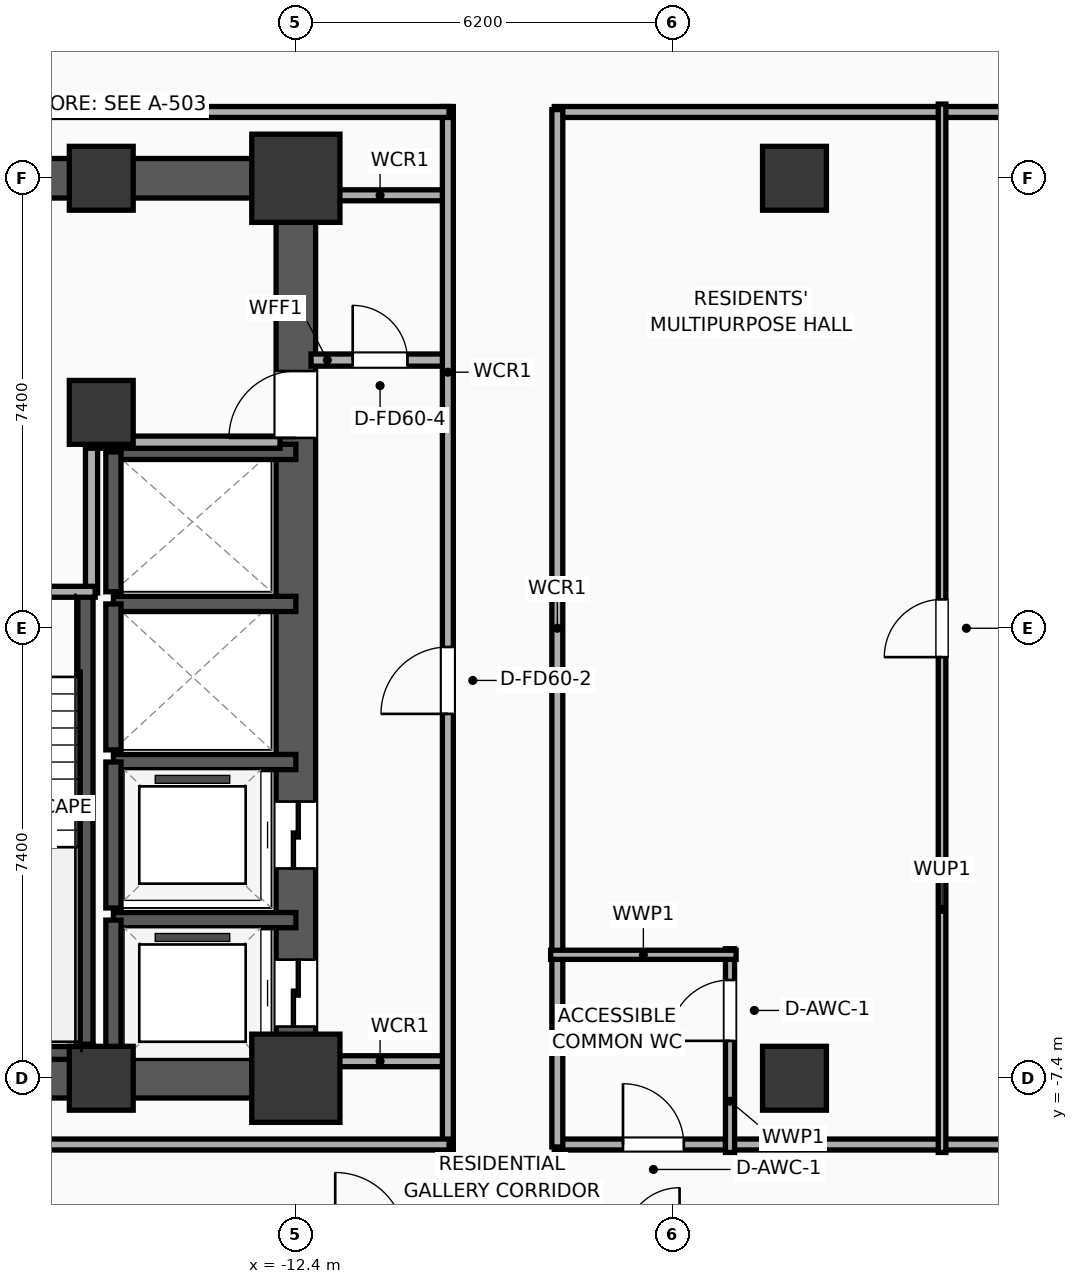
"""IFC4 building model, lengths in metres.
Left out: names, types, materials, properties, quantities, classifications, styles, units other than length and angle.
Written with IfcOpenShell. Run it as: python <this file> out.ifc"""

import sys

from ifc_helpers import new_model, si_unit, direction, frame, frame_2d, origin, origin_2d, place, context, subcontext, project, spatial, rectangle, extrude, element, fill, save


model = new_model("IFC4")
c1 = context("Model", 3, precision=1e-05, world=origin(), true_north=direction((0.0, 1.0)))
c2 = subcontext(c1, "Body", "Model", "MODEL_VIEW")
j1 = project(units=[si_unit("LENGTHUNIT", "METRE"), si_unit("PLANEANGLEUNIT", "RADIAN")], contexts=[c1])
p1 = place(None, origin())
s1 = spatial("IfcSite", under=j1, at=p1, CompositionType="ELEMENT")
p2 = place(p1, origin())
s2 = spatial("IfcBuilding", under=s1, at=p2, CompositionType="ELEMENT")
p3 = place(p2, frame((0.0, 0.0, 68.9)))
s3 = spatial("IfcBuildingStorey", under=s2, at=p3, CompositionType="ELEMENT", Elevation=68.9)
for number, where, z_axis, x_axis in (
    (1, (-15.6, -7.4, 0.0), (0.0, 0.0, 1.0), (1.0, 0.0, 0.0)),
    (2, (-15.6, 7.4, 0.0), (0.0, 0.0, 1.0), (1.0, 0.0, 0.0)),
):
    element("IfcColumn", number, at=place(p3, frame(where, z_axis=z_axis, x_axis=x_axis)), inside=s3, PredefinedType="COLUMN", context=c2, shape_type="SweptSolid", body=[
        extrude(rectangle(XDim=1.05, YDim=1.05, at=origin_2d()), origin(), (0.0, 0.0, 1.0), 3.9),
    ])
p4 = place(p3, frame((-12.4, -7.4, 0.0), z_axis=(0.0, 0.0, 1.0), x_axis=(1.0, 0.0, 0.0)))
e3 = element("IfcColumn", 3, at=p4, inside=s3, PredefinedType="COLUMN", context=c2, shape_type="SweptSolid", body=[
    extrude(rectangle(XDim=1.45, YDim=1.45, at=origin_2d()), origin(), (0.0, 0.0, 1.0), 3.9),
])
p5 = place(p3, frame((-15.6, 3.55, 0.0), z_axis=(0.0, 0.0, 1.0), x_axis=(1.0, 0.0, 0.0)))
e4 = element("IfcColumn", 4, at=p5, inside=s3, PredefinedType="COLUMN", context=c2, shape_type="SweptSolid", body=[
    extrude(rectangle(XDim=1.05, YDim=1.05, at=origin_2d()), origin(), (0.0, 0.0, 1.0), 3.9),
])
p6 = place(p3, frame((-12.4, 7.4, 0.0), z_axis=(0.0, 0.0, 1.0), x_axis=(1.0, 0.0, 0.0)))
e5 = element("IfcColumn", 5, at=p6, inside=s3, PredefinedType="COLUMN", context=c2, shape_type="SweptSolid", body=[
    extrude(rectangle(XDim=1.45, YDim=1.45, at=origin_2d()), origin(), (0.0, 0.0, 1.0), 3.9),
])
for number, where, z_axis, x_axis in (
    (6, (-19.525, -7.4, 0.0), (0.0, 0.0, 1.0), (1.0, 0.0, 0.0)),
    (7, (-19.525, 7.4, 0.0), (0.0, 0.0, 1.0), (1.0, 0.0, 0.0)),
):
    element("IfcWall", number, at=place(p3, frame(where, z_axis=z_axis, x_axis=x_axis)), inside=s3, PredefinedType="SHEAR", context=c2, shape_type="SweptSolid", body=[
        extrude(rectangle(XDim=7.45, YDim=0.65, at=frame_2d((3.725, 0.0))), origin(), (0.0, 0.0, 1.0), 3.65),
    ])
p7 = place(p3, frame((-12.4, -7.4, 0.0), z_axis=(0.0, 0.0, 1.0), x_axis=(0.0, 1.0, 0.0)))
e8 = element("IfcWall", 8, at=p7, inside=s3, PredefinedType="SHEAR", context=c2, shape_type="SweptSolid", body=[
    extrude(rectangle(XDim=14.8, YDim=0.65, at=frame_2d((7.4, 0.0))), origin(), (0.0, 0.0, 1.0), 3.65),
])
p8 = place(p7, frame((0.85, 0.0, 0.0)))
e9 = element("IfcOpeningElement", 9, at=p8, cuts=e8, PredefinedType="OPENING", context=c2, shape_type="SweptSolid", body=[
    extrude(rectangle(XDim=1.1, YDim=2.05, at=frame_2d((0.55, 1.025))), frame((0.0, 0.335, 0.0), z_axis=(0.0, -1.0, 0.0), x_axis=(1.0, 0.0, 0.0)), (0.0, 0.0, 1.0), 0.67),
])
p9 = place(p7, frame((3.45, 0.0, 0.0)))
e10 = element("IfcOpeningElement", 10, at=p9, cuts=e8, PredefinedType="OPENING", context=c2, shape_type="SweptSolid", body=[
    extrude(rectangle(XDim=1.1, YDim=2.05, at=frame_2d((0.55, 1.025))), frame((0.0, 0.335, 0.0), z_axis=(0.0, -1.0, 0.0), x_axis=(1.0, 0.0, 0.0)), (0.0, 0.0, 1.0), 0.67),
])
p10 = place(p7, frame((10.53, 0.0, 0.0)))
e11 = element("IfcOpeningElement", 11, at=p10, cuts=e8, PredefinedType="OPENING", context=c2, shape_type="SweptSolid", body=[
    extrude(rectangle(XDim=1.1, YDim=2.05, at=frame_2d((0.55, 1.025))), frame((0.0, 0.335, 0.0), z_axis=(0.0, -1.0, 0.0), x_axis=(1.0, 0.0, 0.0)), (0.0, 0.0, 1.0), 0.67),
])
p11 = place(p3, frame((-15.86, -7.085, 0.0), z_axis=(0.0, 0.0, 1.0), x_axis=(0.0, 1.0, 0.0)))
e12 = element("IfcWall", 12, at=p11, inside=s3, PredefinedType="SOLIDWALL", context=c2, shape_type="SweptSolid", body=[
    extrude(rectangle(XDim=7.685, YDim=0.25, at=frame_2d((3.843, 0.0))), origin(), (0.0, 0.0, 1.0), 3.65),
])
p12 = place(p3, frame((-19.2, -6.965, 0.0), z_axis=(0.0, 0.0, 1.0), x_axis=(1.0, 0.0, 0.0)))
e13 = element("IfcWall", 13, at=p12, inside=s3, PredefinedType="SOLIDWALL", context=c2, shape_type="SweptSolid", body=[
    extrude(rectangle(XDim=3.46, YDim=0.25, at=frame_2d((1.73, 0.0))), origin(), (0.0, 0.0, 1.0), 3.65),
])
for number, where, z_axis, x_axis in (
    (14, (-4.2, -7.4, 0.0), (0.0, 0.0, 1.0), (1.0, 0.0, 0.0)),
    (15, (-4.2, 7.4, 0.0), (0.0, 0.0, 1.0), (1.0, 0.0, 0.0)),
):
    element("IfcColumn", number, at=place(p3, frame(where, z_axis=z_axis, x_axis=x_axis)), inside=s3, PredefinedType="COLUMN", context=c2, shape_type="SweptSolid", body=[
        extrude(rectangle(XDim=1.05, YDim=1.05, at=origin_2d()), origin(), (0.0, 0.0, 1.0), 3.9),
    ])
p13 = place(p3, frame((-12.4, -4.8, 0.0), z_axis=(0.0, 0.0, 1.0), x_axis=(-1.0, 0.0, 0.0)))
e16 = element("IfcWall", 16, at=p13, inside=s3, PredefinedType="SOLIDWALL", context=c2, shape_type="SweptSolid", body=[
    extrude(rectangle(XDim=3.0, YDim=0.25, at=frame_2d((1.5, 0.0))), origin(), (0.0, 0.0, 1.0), 3.65),
])
p14 = place(p3, frame((-15.4, -4.8, 0.0), z_axis=(0.0, 0.0, 1.0), x_axis=(0.0, -1.0, 0.0)))
e17 = element("IfcWall", 17, at=p14, inside=s3, PredefinedType="SOLIDWALL", context=c2, shape_type="SweptSolid", body=[
    extrude(rectangle(XDim=2.6, YDim=0.25, at=frame_2d((1.3, 0.0))), origin(), (0.0, 0.0, 1.0), 3.65),
])
p15 = place(p3, frame((-12.4, -2.2, 0.0), z_axis=(0.0, 0.0, 1.0), x_axis=(-1.0, 0.0, 0.0)))
e18 = element("IfcWall", 18, at=p15, inside=s3, PredefinedType="SOLIDWALL", context=c2, shape_type="SweptSolid", body=[
    extrude(rectangle(XDim=3.0, YDim=0.25, at=frame_2d((1.5, 0.0))), origin(), (0.0, 0.0, 1.0), 3.65),
])
p16 = place(p3, frame((-15.4, -2.2, 0.0), z_axis=(0.0, 0.0, 1.0), x_axis=(0.0, -1.0, 0.0)))
e19 = element("IfcWall", 19, at=p16, inside=s3, PredefinedType="SOLIDWALL", context=c2, shape_type="SweptSolid", body=[
    extrude(rectangle(XDim=2.4, YDim=0.25, at=frame_2d((1.2, 0.0))), origin(), (0.0, 0.0, 1.0), 3.65),
])
p17 = place(p3, frame((-12.4, 0.4, 0.0), z_axis=(0.0, 0.0, 1.0), x_axis=(-1.0, 0.0, 0.0)))
e20 = element("IfcWall", 20, at=p17, inside=s3, PredefinedType="SOLIDWALL", context=c2, shape_type="SweptSolid", body=[
    extrude(rectangle(XDim=3.0, YDim=0.25, at=frame_2d((1.5, 0.0))), origin(), (0.0, 0.0, 1.0), 3.65),
])
p18 = place(p3, frame((-15.4, 0.4, 0.0), z_axis=(0.0, 0.0, 1.0), x_axis=(0.0, -1.0, 0.0)))
e21 = element("IfcWall", 21, at=p18, inside=s3, PredefinedType="SOLIDWALL", context=c2, shape_type="SweptSolid", body=[
    extrude(rectangle(XDim=2.4, YDim=0.25, at=frame_2d((1.2, 0.0))), origin(), (0.0, 0.0, 1.0), 3.65),
])
p19 = place(p3, frame((-12.4, 2.9, 0.0), z_axis=(0.0, 0.0, 1.0), x_axis=(-1.0, 0.0, 0.0)))
e22 = element("IfcWall", 22, at=p19, inside=s3, PredefinedType="SOLIDWALL", context=c2, shape_type="SweptSolid", body=[
    extrude(rectangle(XDim=3.0, YDim=0.25, at=frame_2d((1.5, 0.0))), origin(), (0.0, 0.0, 1.0), 3.65),
])
p20 = place(p3, frame((-15.4, 2.9, 0.0), z_axis=(0.0, 0.0, 1.0), x_axis=(0.0, -1.0, 0.0)))
e23 = element("IfcWall", 23, at=p20, inside=s3, PredefinedType="SOLIDWALL", context=c2, shape_type="SweptSolid", body=[
    extrude(rectangle(XDim=2.3, YDim=0.25, at=frame_2d((1.15, 0.0))), origin(), (0.0, 0.0, 1.0), 3.65),
])
p21 = place(p3, frame((-15.76, 0.58, 0.0), z_axis=(0.0, 0.0, 1.0), x_axis=(0.0, 1.0, 0.0)))
e24 = element("IfcWall", 24, at=p21, inside=s3, PredefinedType="PARTITIONING", context=c2, shape_type="SweptSolid", body=[
    extrude(rectangle(XDim=2.52, YDim=0.2, at=frame_2d((1.26, 0.0))), origin(), (0.0, 0.0, 1.0), 3.65),
])
p22 = place(p3, frame((-15.82, 3.06, 0.0), z_axis=(0.0, 0.0, 1.0), x_axis=(1.0, 0.0, 0.0)))
e25 = element("IfcWall", 25, at=p22, inside=s3, PredefinedType="PARTITIONING", context=c2, shape_type="SweptSolid", body=[
    extrude(rectangle(XDim=3.16, YDim=0.2, at=frame_2d((1.58, 0.0))), origin(), (0.0, 0.0, 1.0), 3.65),
])
p23 = place(p3, frame((-19.06, 0.6, 0.0), z_axis=(0.0, 0.0, 1.0), x_axis=(1.0, 0.0, 0.0)))
e26 = element("IfcWall", 26, at=p23, inside=s3, PredefinedType="PARTITIONING", context=c2, shape_type="SweptSolid", body=[
    extrude(rectangle(XDim=3.36, YDim=0.18, at=frame_2d((1.68, 0.0))), origin(), (0.0, 0.0, 1.0), 3.65),
])
p24 = place(p23, frame((1.155, 0.0, 0.0)))
e27 = element("IfcOpeningElement", 27, at=p24, cuts=e26, PredefinedType="OPENING", context=c2, shape_type="SweptSolid", body=[
    extrude(rectangle(XDim=1.05, YDim=2.05, at=frame_2d((0.525, 1.025))), frame((0.0, 0.1, 0.0), z_axis=(0.0, -1.0, 0.0), x_axis=(1.0, 0.0, 0.0)), (0.0, 0.0, 1.0), 0.2),
])
p25 = place(p3, frame((-12.15, 4.41, 0.0), z_axis=(0.0, 0.0, 1.0), x_axis=(1.0, 0.0, 0.0)))
e28 = element("IfcWall", 28, at=p25, inside=s3, PredefinedType="PARTITIONING", context=c2, shape_type="SweptSolid", body=[
    extrude(rectangle(XDim=2.27, YDim=0.2, at=frame_2d((1.135, 0.0))), origin(), (0.0, 0.0, 1.0), 3.65),
])
p26 = place(p25, frame((0.685, 0.0, 0.0)))
e29 = element("IfcOpeningElement", 29, at=p26, cuts=e28, PredefinedType="OPENING", context=c2, shape_type="SweptSolid", body=[
    extrude(rectangle(XDim=0.9, YDim=2.05, at=frame_2d((0.45, 1.025))), frame((0.0, 0.11, 0.0), z_axis=(0.0, -1.0, 0.0), x_axis=(1.0, 0.0, 0.0)), (0.0, 0.0, 1.0), 0.22),
])
for number, where, z_axis, x_axis in (
    (30, (-12.15, 7.12, 0.0), (0.0, 0.0, 1.0), (1.0, 0.0, 0.0)),
    (31, (-12.15, -7.12, 0.0), (0.0, 0.0, 1.0), (1.0, 0.0, 0.0)),
):
    element("IfcWall", number, at=place(p3, frame(where, z_axis=z_axis, x_axis=x_axis)), inside=s3, PredefinedType="PARTITIONING", context=c2, shape_type="SweptSolid", body=[
        extrude(rectangle(XDim=2.27, YDim=0.18, at=frame_2d((1.135, 0.0))), origin(), (0.0, 0.0, 1.0), 2.94),
    ])
p27 = place(p3, frame((-9.9, -8.58, 0.0), z_axis=(0.0, 0.0, 1.0), x_axis=(0.0, 1.0, 0.0)))
e32 = element("IfcWall", 32, at=p27, inside=s3, PredefinedType="PARTITIONING", context=c2, shape_type="SweptSolid", body=[
    extrude(rectangle(XDim=17.16, YDim=0.18, at=frame_2d((8.58, 0.0))), origin(), (0.0, 0.0, 1.0), 3.65),
])
p28 = place(p27, frame((7.172, 0.0, 0.0)))
e33 = element("IfcOpeningElement", 33, at=p28, cuts=e32, PredefinedType="OPENING", context=c2, shape_type="SweptSolid", body=[
    extrude(rectangle(XDim=1.1, YDim=2.05, at=frame_2d((0.55, 1.025))), frame((0.0, 0.1, 0.0), z_axis=(0.0, -1.0, 0.0), x_axis=(1.0, 0.0, 0.0)), (0.0, 0.0, 1.0), 0.2),
])
p29 = place(p3, frame((-33.41, 8.49, 0.0), z_axis=(0.0, 0.0, 1.0), x_axis=(1.0, 0.0, 0.0)))
e34 = element("IfcWall", 34, at=p29, inside=s3, PredefinedType="PARTITIONING", context=c2, shape_type="SweptSolid", body=[
    extrude(rectangle(XDim=23.53, YDim=0.18, at=frame_2d((11.765, 0.0))), origin(), (0.0, 0.0, 1.0), 3.65),
])
p30 = place(p29, frame((4.54, 0.0, 0.0)))
e35 = element("IfcOpeningElement", 35, at=p30, cuts=e34, PredefinedType="OPENING", context=c2, shape_type="SweptSolid", body=[
    extrude(rectangle(XDim=1.15, YDim=2.05, at=frame_2d((0.575, 1.025))), frame((0.0, 0.1, 0.0), z_axis=(0.0, -1.0, 0.0), x_axis=(1.0, 0.0, 0.0)), (0.0, 0.0, 1.0), 0.2),
])
p31 = place(p3, frame((-33.41, -8.49, 0.0), z_axis=(0.0, 0.0, 1.0), x_axis=(1.0, 0.0, 0.0)))
e36 = element("IfcWall", 36, at=p31, inside=s3, PredefinedType="PARTITIONING", context=c2, shape_type="SweptSolid", body=[
    extrude(rectangle(XDim=23.53, YDim=0.18, at=frame_2d((11.765, 0.0))), origin(), (0.0, 0.0, 1.0), 3.65),
])
p32 = place(p3, frame((-8.15, 8.49, 0.0), z_axis=(0.0, 0.0, 1.0), x_axis=(1.0, 0.0, 0.0)))
e37 = element("IfcWall", 37, at=p32, inside=s3, PredefinedType="PARTITIONING", context=c2, shape_type="SweptSolid", body=[
    extrude(rectangle(XDim=16.3, YDim=0.18, at=frame_2d((8.15, 0.0))), origin(), (0.0, 0.0, 1.0), 3.65),
])
p33 = place(p32, frame((8.49, 0.0, 0.0)))
e38 = element("IfcOpeningElement", 38, at=p33, cuts=e37, PredefinedType="OPENING", context=c2, shape_type="SweptSolid", body=[
    extrude(rectangle(XDim=0.95, YDim=2.05, at=frame_2d((0.475, 1.025))), frame((0.0, 0.1, 0.0), z_axis=(0.0, -1.0, 0.0), x_axis=(1.0, 0.0, 0.0)), (0.0, 0.0, 1.0), 0.2),
])
p34 = place(p3, frame((-8.15, -8.49, 0.0), z_axis=(0.0, 0.0, 1.0), x_axis=(1.0, 0.0, 0.0)))
e39 = element("IfcWall", 39, at=p34, inside=s3, PredefinedType="PARTITIONING", context=c2, shape_type="SweptSolid", body=[
    extrude(rectangle(XDim=16.3, YDim=0.18, at=frame_2d((8.15, 0.0))), origin(), (0.0, 0.0, 1.0), 3.65),
])
p35 = place(p34, frame((1.13, 0.0, 0.0)))
e40 = element("IfcOpeningElement", 40, at=p35, cuts=e39, PredefinedType="OPENING", context=c2, shape_type="SweptSolid", body=[
    extrude(rectangle(XDim=1.0, YDim=2.05, at=frame_2d((0.5, 1.025))), frame((0.0, 0.1, 0.0), z_axis=(0.0, -1.0, 0.0), x_axis=(1.0, 0.0, 0.0)), (0.0, 0.0, 1.0), 0.2),
])
p36 = place(p34, frame((10.12, 0.0, 0.0)))
e41 = element("IfcOpeningElement", 41, at=p36, cuts=e39, PredefinedType="OPENING", context=c2, shape_type="SweptSolid", body=[
    extrude(rectangle(XDim=0.95, YDim=2.05, at=frame_2d((0.475, 1.025))), frame((0.0, 0.1, 0.0), z_axis=(0.0, -1.0, 0.0), x_axis=(1.0, 0.0, 0.0)), (0.0, 0.0, 1.0), 0.2),
])
p37 = place(p3, frame((-8.1, -8.53, 0.0), z_axis=(0.0, 0.0, 1.0), x_axis=(0.0, 1.0, 0.0)))
e42 = element("IfcWall", 42, at=p37, inside=s3, PredefinedType="PARTITIONING", context=c2, shape_type="SweptSolid", body=[
    extrude(rectangle(XDim=17.06, YDim=0.18, at=frame_2d((8.53, 0.0))), origin(), (0.0, 0.0, 1.0), 3.65),
])
p38 = place(p3, frame((-5.26, -8.62, 0.0), z_axis=(0.0, 0.0, 1.0), x_axis=(0.0, 1.0, 0.0)))
e43 = element("IfcWall", 43, at=p38, inside=s3, PredefinedType="PLUMBINGWALL", context=c2, shape_type="SweptSolid", body=[
    extrude(rectangle(XDim=3.35, YDim=0.15, at=frame_2d((1.675, 0.0))), origin(), (0.0, 0.0, 1.0), 3.65),
])
p39 = place(p38, frame((1.835, 0.0, 0.0)))
e44 = element("IfcOpeningElement", 44, at=p39, cuts=e43, PredefinedType="OPENING", context=c2, shape_type="SweptSolid", body=[
    extrude(rectangle(XDim=1.0, YDim=2.05, at=frame_2d((0.5, 1.025))), frame((0.0, 0.085, 0.0), z_axis=(0.0, -1.0, 0.0), x_axis=(1.0, 0.0, 0.0)), (0.0, 0.0, 1.0), 0.17),
])
p40 = place(p3, frame((-8.21, -5.37, 0.0), z_axis=(0.0, 0.0, 1.0), x_axis=(1.0, 0.0, 0.0)))
e45 = element("IfcWall", 45, at=p40, inside=s3, PredefinedType="PLUMBINGWALL", context=c2, shape_type="SweptSolid", body=[
    extrude(rectangle(XDim=3.05, YDim=0.15, at=frame_2d((1.525, 0.0))), origin(), (0.0, 0.0, 1.0), 3.65),
])
p41 = place(p3, frame((-1.773, -8.62, 0.0), z_axis=(0.0, 0.0, 1.0), x_axis=(0.0, 1.0, 0.0)))
e46 = element("IfcWall", 46, at=p41, inside=s3, PredefinedType="PARTITIONING", context=c2, shape_type="SweptSolid", body=[
    extrude(rectangle(XDim=17.24, YDim=0.125, at=frame_2d((8.62, 0.0))), origin(), (0.0, 0.0, 1.0), 3.65),
])
p42 = place(p41, frame((8.145, 0.0, 0.0)))
e47 = element("IfcOpeningElement", 47, at=p42, cuts=e46, PredefinedType="OPENING", context=c2, shape_type="SweptSolid", body=[
    extrude(rectangle(XDim=0.95, YDim=2.05, at=frame_2d((0.475, 1.025))), frame((0.0, 0.073, 0.0), z_axis=(0.0, -1.0, 0.0), x_axis=(1.0, 0.0, 0.0)), (0.0, 0.0, 1.0), 0.145),
])
p43 = place(p8, origin())
e48 = element("IfcDoor", 48, at=p43, inside=s3, OperationType="SLIDING_TO_LEFT", PredefinedType="DOOR", context=c2, shape_type="SweptSolid", body=[
    extrude(rectangle(XDim=1.1, YDim=2.05, at=frame_2d((0.55, 1.025))), frame((0.0, 0.025, 0.0), z_axis=(0.0, -1.0, 0.0), x_axis=(1.0, 0.0, 0.0)), (0.0, 0.0, 1.0), 0.05),
])
fill(e9, e48)
p44 = place(p9, origin())
e49 = element("IfcDoor", 49, at=p44, inside=s3, OperationType="SLIDING_TO_LEFT", PredefinedType="DOOR", context=c2, shape_type="SweptSolid", body=[
    extrude(rectangle(XDim=1.1, YDim=2.05, at=frame_2d((0.55, 1.025))), frame((0.0, 0.025, 0.0), z_axis=(0.0, -1.0, 0.0), x_axis=(1.0, 0.0, 0.0)), (0.0, 0.0, 1.0), 0.05),
])
fill(e10, e49)
p45 = place(p26, origin())
e50 = element("IfcDoor", 50, at=p45, inside=s3, OperationType="SINGLE_SWING_LEFT", PredefinedType="DOOR", context=c2, shape_type="SweptSolid", body=[
    extrude(rectangle(XDim=0.9, YDim=2.05, at=frame_2d((0.45, 1.025))), frame((0.0, 0.025, 0.0), z_axis=(0.0, -1.0, 0.0), x_axis=(1.0, 0.0, 0.0)), (0.0, 0.0, 1.0), 0.05),
])
fill(e29, e50)
p46 = place(p28, origin())
e51 = element("IfcDoor", 51, at=p46, inside=s3, OperationType="SINGLE_SWING_LEFT", PredefinedType="DOOR", context=c2, shape_type="SweptSolid", body=[
    extrude(rectangle(XDim=1.1, YDim=2.05, at=frame_2d((0.55, 1.025))), frame((0.0, 0.025, 0.0), z_axis=(0.0, -1.0, 0.0), x_axis=(1.0, 0.0, 0.0)), (0.0, 0.0, 1.0), 0.05),
])
fill(e33, e51)
p47 = place(p35, origin())
e52 = element("IfcDoor", 52, at=p47, inside=s3, OperationType="SINGLE_SWING_LEFT", PredefinedType="DOOR", context=c2, shape_type="SweptSolid", body=[
    extrude(rectangle(XDim=1.0, YDim=2.05, at=frame_2d((0.5, 1.025))), frame((0.0, 0.025, 0.0), z_axis=(0.0, -1.0, 0.0), x_axis=(1.0, 0.0, 0.0)), (0.0, 0.0, 1.0), 0.05),
])
fill(e40, e52)
p48 = place(p39, origin())
e53 = element("IfcDoor", 53, at=p48, inside=s3, OperationType="SINGLE_SWING_LEFT", PredefinedType="DOOR", context=c2, shape_type="SweptSolid", body=[
    extrude(rectangle(XDim=1.0, YDim=2.05, at=frame_2d((0.5, 1.025))), frame((0.0, 0.025, 0.0), z_axis=(0.0, -1.0, 0.0), x_axis=(1.0, 0.0, 0.0)), (0.0, 0.0, 1.0), 0.05),
])
fill(e44, e53)
p49 = place(p42, origin())
e54 = element("IfcDoor", 54, at=p49, inside=s3, OperationType="SINGLE_SWING_LEFT", PredefinedType="DOOR", context=c2, shape_type="SweptSolid", body=[
    extrude(rectangle(XDim=0.95, YDim=2.05, at=frame_2d((0.475, 1.025))), frame((0.0, 0.025, 0.0), z_axis=(0.0, -1.0, 0.0), x_axis=(1.0, 0.0, 0.0)), (0.0, 0.0, 1.0), 0.05),
])
fill(e47, e54)
p50 = place(p10, origin())
e55 = element("IfcDoor", 55, at=p50, inside=s3, OperationType="SINGLE_SWING_LEFT", PredefinedType="DOOR", context=c2, shape_type="SweptSolid", body=[
    extrude(rectangle(XDim=1.1, YDim=2.05, at=frame_2d((0.55, 1.025))), frame((0.0, 0.025, 0.0), z_axis=(0.0, -1.0, 0.0), x_axis=(1.0, 0.0, 0.0)), (0.0, 0.0, 1.0), 0.05),
])
fill(e11, e55)
save(model, sys.argv[1])
